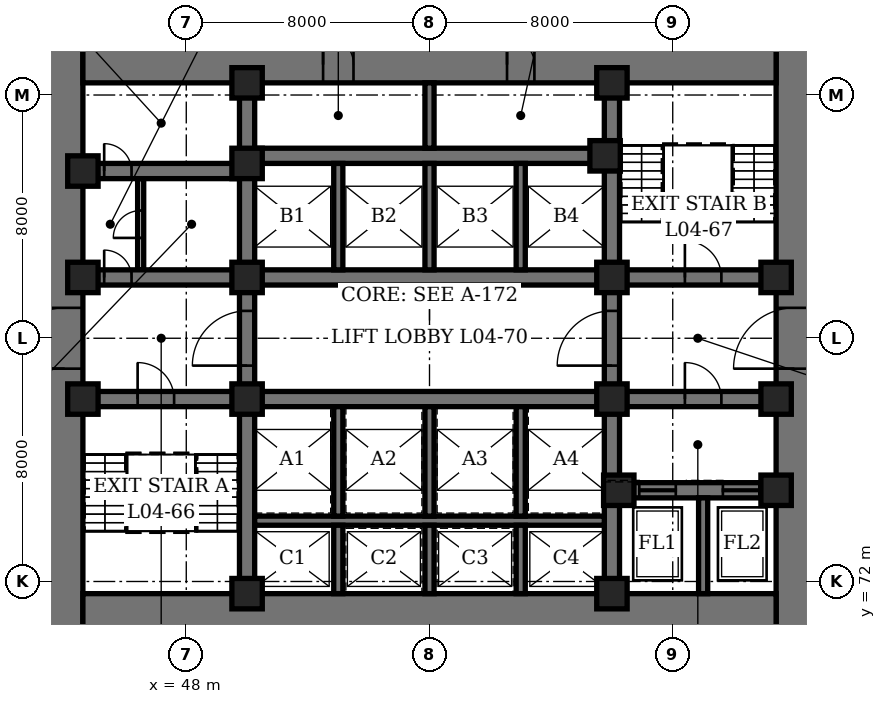
"""IFC4 building model, lengths in metres.
Left out: names, types, materials, properties, quantities, classifications, styles, units other than length and angle.
Written with IfcOpenShell. Run it as: python <this file> out.ifc"""

import sys

from ifc_helpers import new_model, si_unit, direction, frame, frame_2d, origin, origin_2d, place, context, subcontext, project, spatial, rectangle, hollow_rectangle, extrude, element, fill, save


model = new_model("IFC4")
c1 = context("Model", 3, precision=1e-05, world=origin(), true_north=direction((0.0, 1.0)))
c2 = subcontext(c1, "Body", "Model", "MODEL_VIEW")
j1 = project(units=[si_unit("LENGTHUNIT", "METRE"), si_unit("PLANEANGLEUNIT", "RADIAN")], contexts=[c1])
p1 = place(None, origin())
s1 = spatial("IfcSite", under=j1, at=p1, CompositionType="ELEMENT")
p2 = place(p1, origin())
s2 = spatial("IfcBuilding", under=s1, at=p2, CompositionType="ELEMENT")
p3 = place(p2, frame((0.0, 0.0, 19.9)))
s3 = spatial("IfcBuildingStorey", under=s2, at=p3, CompositionType="ELEMENT", Elevation=19.9)
p4 = place(p3, frame((44.0, 70.4, 0.0), z_axis=(0.0, 0.0, 1.0), x_axis=(0.0, 1.0, 0.0)))
e1 = element("IfcWall", 1, at=p4, inside=s3, PredefinedType="SHEAR", context=c2, shape_type="SweptSolid", body=[
    extrude(rectangle(XDim=19.2, YDim=1.2, at=frame_2d((9.6, 0.0))), origin(), (0.0, 0.0, 1.0), 6.0),
])
p5 = place(p4, frame((8.6, 0.0, 0.0)))
e2 = element("IfcOpeningElement", 2, at=p5, cuts=e1, PredefinedType="OPENING", context=c2, shape_type="SweptSolid", body=[
    extrude(rectangle(XDim=2.0, YDim=2.4, at=frame_2d((1.0, 1.2))), frame((0.0, 0.61, 0.0), z_axis=(0.0, -1.0, 0.0), x_axis=(1.0, 0.0, 0.0)), (0.0, 0.0, 1.0), 1.22),
])
p6 = place(p3, frame((68.0, 70.4, 0.0), z_axis=(0.0, 0.0, 1.0), x_axis=(0.0, 1.0, 0.0)))
e3 = element("IfcWall", 3, at=p6, inside=s3, PredefinedType="SHEAR", context=c2, shape_type="SweptSolid", body=[
    extrude(rectangle(XDim=19.2, YDim=1.2, at=frame_2d((9.6, 0.0))), origin(), (0.0, 0.0, 1.0), 6.0),
])
p7 = place(p6, frame((8.6, 0.0, 0.0)))
e4 = element("IfcOpeningElement", 4, at=p7, cuts=e3, PredefinedType="OPENING", context=c2, shape_type="SweptSolid", body=[
    extrude(rectangle(XDim=2.0, YDim=2.4, at=frame_2d((1.0, 1.2))), frame((0.0, 0.61, 0.0), z_axis=(0.0, -1.0, 0.0), x_axis=(1.0, 0.0, 0.0)), (0.0, 0.0, 1.0), 1.22),
])
p8 = place(p3, frame((44.6, 71.0, 0.0), z_axis=(0.0, 0.0, 1.0), x_axis=(1.0, 0.0, 0.0)))
e5 = element("IfcWall", 5, at=p8, inside=s3, PredefinedType="SHEAR", context=c2, shape_type="SweptSolid", body=[
    extrude(rectangle(XDim=22.8, YDim=1.2, at=frame_2d((11.4, 0.0))), origin(), (0.0, 0.0, 1.0), 6.0),
])
p9 = place(p3, frame((44.6, 89.0, 0.0), z_axis=(0.0, 0.0, 1.0), x_axis=(1.0, 0.0, 0.0)))
e6 = element("IfcWall", 6, at=p9, inside=s3, PredefinedType="SHEAR", context=c2, shape_type="SweptSolid", body=[
    extrude(rectangle(XDim=22.8, YDim=1.2, at=frame_2d((11.4, 0.0))), origin(), (0.0, 0.0, 1.0), 6.0),
])
p10 = place(p9, frame((7.9, 0.0, 0.0)))
e7 = element("IfcOpeningElement", 7, at=p10, cuts=e6, PredefinedType="OPENING", context=c2, shape_type="SweptSolid", body=[
    extrude(rectangle(XDim=1.0, YDim=2.1, at=frame_2d((0.5, 1.05))), frame((0.0, 0.61, 0.0), z_axis=(0.0, -1.0, 0.0), x_axis=(1.0, 0.0, 0.0)), (0.0, 0.0, 1.0), 1.22),
])
p11 = place(p9, frame((13.95, 0.0, 0.0)))
e8 = element("IfcOpeningElement", 8, at=p11, cuts=e6, PredefinedType="OPENING", context=c2, shape_type="SweptSolid", body=[
    extrude(rectangle(XDim=0.9, YDim=2.1, at=frame_2d((0.45, 1.05))), frame((0.0, 0.61, 0.0), z_axis=(0.0, -1.0, 0.0), x_axis=(1.0, 0.0, 0.0)), (0.0, 0.0, 1.0), 1.22),
])
p12 = place(p3, frame((50.0, 71.6, 0.0), z_axis=(0.0, 0.0, 1.0), x_axis=(0.0, 1.0, 0.0)))
e9 = element("IfcWall", 9, at=p12, inside=s3, PredefinedType="SHEAR", context=c2, shape_type="SweptSolid", body=[
    extrude(rectangle(XDim=16.8, YDim=0.5, at=frame_2d((8.4, 0.0))), origin(), (0.0, 0.0, 1.0), 6.0),
])
p13 = place(p12, frame((7.5, 0.0, 0.0)))
e10 = element("IfcOpeningElement", 10, at=p13, cuts=e9, PredefinedType="OPENING", context=c2, shape_type="SweptSolid", body=[
    extrude(rectangle(XDim=1.8, YDim=2.4, at=frame_2d((0.9, 1.2))), frame((0.0, 0.26, 0.0), z_axis=(0.0, -1.0, 0.0), x_axis=(1.0, 0.0, 0.0)), (0.0, 0.0, 1.0), 0.52),
])
p14 = place(p3, frame((62.0, 71.6, 0.0), z_axis=(0.0, 0.0, 1.0), x_axis=(0.0, 1.0, 0.0)))
e11 = element("IfcWall", 11, at=p14, inside=s3, PredefinedType="SHEAR", context=c2, shape_type="SweptSolid", body=[
    extrude(rectangle(XDim=16.8, YDim=0.5, at=frame_2d((8.4, 0.0))), origin(), (0.0, 0.0, 1.0), 6.0),
])
p15 = place(p14, frame((7.5, 0.0, 0.0)))
e12 = element("IfcOpeningElement", 12, at=p15, cuts=e11, PredefinedType="OPENING", context=c2, shape_type="SweptSolid", body=[
    extrude(rectangle(XDim=1.8, YDim=2.4, at=frame_2d((0.9, 1.2))), frame((0.0, 0.26, 0.0), z_axis=(0.0, -1.0, 0.0), x_axis=(1.0, 0.0, 0.0)), (0.0, 0.0, 1.0), 0.52),
])
p16 = place(p3, frame((44.6, 78.0, 0.0), z_axis=(0.0, 0.0, 1.0), x_axis=(1.0, 0.0, 0.0)))
e13 = element("IfcWall", 13, at=p16, inside=s3, PredefinedType="SHEAR", context=c2, shape_type="SweptSolid", body=[
    extrude(rectangle(XDim=5.15, YDim=0.5, at=frame_2d((2.575, 0.0))), origin(), (0.0, 0.0, 1.0), 6.0),
])
p17 = place(p16, frame((1.8, 0.0, 0.0)))
e14 = element("IfcOpeningElement", 14, at=p17, cuts=e13, PredefinedType="OPENING", context=c2, shape_type="SweptSolid", body=[
    extrude(rectangle(XDim=1.2, YDim=2.1, at=frame_2d((0.6, 1.05))), frame((0.0, 0.26, 0.0), z_axis=(0.0, -1.0, 0.0), x_axis=(1.0, 0.0, 0.0)), (0.0, 0.0, 1.0), 0.52),
])
p18 = place(p3, frame((44.6, 82.0, 0.0), z_axis=(0.0, 0.0, 1.0), x_axis=(1.0, 0.0, 0.0)))
e15 = element("IfcWall", 15, at=p18, inside=s3, PredefinedType="SHEAR", context=c2, shape_type="SweptSolid", body=[
    extrude(rectangle(XDim=5.15, YDim=0.5, at=frame_2d((2.575, 0.0))), origin(), (0.0, 0.0, 1.0), 6.0),
])
p19 = place(p18, frame((0.7, 0.0, 0.0)))
e16 = element("IfcOpeningElement", 16, at=p19, cuts=e15, PredefinedType="OPENING", context=c2, shape_type="SweptSolid", body=[
    extrude(rectangle(XDim=0.9, YDim=2.1, at=frame_2d((0.45, 1.05))), frame((0.0, 0.26, 0.0), z_axis=(0.0, -1.0, 0.0), x_axis=(1.0, 0.0, 0.0)), (0.0, 0.0, 1.0), 0.52),
])
p20 = place(p3, frame((44.6, 85.5, 0.0), z_axis=(0.0, 0.0, 1.0), x_axis=(1.0, 0.0, 0.0)))
e17 = element("IfcWall", 17, at=p20, inside=s3, PredefinedType="SHEAR", context=c2, shape_type="SweptSolid", body=[
    extrude(rectangle(XDim=5.15, YDim=0.5, at=frame_2d((2.575, 0.0))), origin(), (0.0, 0.0, 1.0), 6.0),
])
p21 = place(p20, frame((0.7, 0.0, 0.0)))
e18 = element("IfcOpeningElement", 18, at=p21, cuts=e17, PredefinedType="OPENING", context=c2, shape_type="SweptSolid", body=[
    extrude(rectangle(XDim=0.9, YDim=2.1, at=frame_2d((0.45, 1.05))), frame((0.0, 0.26, 0.0), z_axis=(0.0, -1.0, 0.0), x_axis=(1.0, 0.0, 0.0)), (0.0, 0.0, 1.0), 0.52),
])
p22 = place(p3, frame((62.25, 75.0, 0.0), z_axis=(0.0, 0.0, 1.0), x_axis=(1.0, 0.0, 0.0)))
e19 = element("IfcWall", 19, at=p22, inside=s3, PredefinedType="SHEAR", context=c2, shape_type="SweptSolid", body=[
    extrude(rectangle(XDim=5.15, YDim=0.5, at=frame_2d((2.575, 0.0))), origin(), (0.0, 0.0, 1.0), 6.0),
])
p23 = place(p22, frame((0.65, 0.0, 0.0)))
e20 = element("IfcOpeningElement", 20, at=p23, cuts=e19, PredefinedType="OPENING", context=c2, shape_type="SweptSolid", body=[
    extrude(rectangle(XDim=1.2, YDim=2.2, at=frame_2d((0.6, 1.1))), frame((0.0, 0.26, 0.0), z_axis=(0.0, -1.0, 0.0), x_axis=(1.0, 0.0, 0.0)), (0.0, 0.0, 1.0), 0.52),
])
p24 = place(p22, frame((3.4, 0.0, 0.0)))
e21 = element("IfcOpeningElement", 21, at=p24, cuts=e19, PredefinedType="OPENING", context=c2, shape_type="SweptSolid", body=[
    extrude(rectangle(XDim=1.2, YDim=2.2, at=frame_2d((0.6, 1.1))), frame((0.0, 0.26, 0.0), z_axis=(0.0, -1.0, 0.0), x_axis=(1.0, 0.0, 0.0)), (0.0, 0.0, 1.0), 0.52),
])
p25 = place(p3, frame((62.25, 78.0, 0.0), z_axis=(0.0, 0.0, 1.0), x_axis=(1.0, 0.0, 0.0)))
e22 = element("IfcWall", 22, at=p25, inside=s3, PredefinedType="SHEAR", context=c2, shape_type="SweptSolid", body=[
    extrude(rectangle(XDim=5.15, YDim=0.5, at=frame_2d((2.575, 0.0))), origin(), (0.0, 0.0, 1.0), 6.0),
])
p26 = place(p25, frame((2.15, 0.0, 0.0)))
e23 = element("IfcOpeningElement", 23, at=p26, cuts=e22, PredefinedType="OPENING", context=c2, shape_type="SweptSolid", body=[
    extrude(rectangle(XDim=1.2, YDim=2.1, at=frame_2d((0.6, 1.05))), frame((0.0, 0.26, 0.0), z_axis=(0.0, -1.0, 0.0), x_axis=(1.0, 0.0, 0.0)), (0.0, 0.0, 1.0), 0.52),
])
p27 = place(p3, frame((62.25, 82.0, 0.0), z_axis=(0.0, 0.0, 1.0), x_axis=(1.0, 0.0, 0.0)))
e24 = element("IfcWall", 24, at=p27, inside=s3, PredefinedType="SHEAR", context=c2, shape_type="SweptSolid", body=[
    extrude(rectangle(XDim=5.15, YDim=0.5, at=frame_2d((2.575, 0.0))), origin(), (0.0, 0.0, 1.0), 6.0),
])
p28 = place(p27, frame((2.15, 0.0, 0.0)))
e25 = element("IfcOpeningElement", 25, at=p28, cuts=e24, PredefinedType="OPENING", context=c2, shape_type="SweptSolid", body=[
    extrude(rectangle(XDim=1.2, YDim=2.1, at=frame_2d((0.6, 1.05))), frame((0.0, 0.26, 0.0), z_axis=(0.0, -1.0, 0.0), x_axis=(1.0, 0.0, 0.0)), (0.0, 0.0, 1.0), 0.52),
])
for number, where, z_axis, x_axis in (
    (26, (50.25, 78.0, 0.0), (0.0, 0.0, 1.0), (1.0, 0.0, 0.0)),
    (27, (50.25, 82.0, 0.0), (0.0, 0.0, 1.0), (1.0, 0.0, 0.0)),
    (28, (50.25, 86.0, 0.0), (0.0, 0.0, 1.0), (1.0, 0.0, 0.0)),
):
    element("IfcWall", number, at=place(p3, frame(where, z_axis=z_axis, x_axis=x_axis)), inside=s3, PredefinedType="SHEAR", context=c2, shape_type="SweptSolid", body=[
        extrude(rectangle(XDim=11.5, YDim=0.5, at=frame_2d((5.75, 0.0))), origin(), (0.0, 0.0, 1.0), 6.0),
    ])
p29 = place(p3, frame((50.25, 74.0, 0.0), z_axis=(0.0, 0.0, 1.0), x_axis=(1.0, 0.0, 0.0)))
e29 = element("IfcWall", 29, at=p29, inside=s3, PredefinedType="SHEAR", context=c2, shape_type="SweptSolid", body=[
    extrude(rectangle(XDim=11.5, YDim=0.3, at=frame_2d((5.75, 0.0))), origin(), (0.0, 0.0, 1.0), 6.0),
])
p30 = place(p3, frame((53.0, 71.6, 0.0), z_axis=(0.0, 0.0, 1.0), x_axis=(0.0, 1.0, 0.0)))
e30 = element("IfcWall", 30, at=p30, inside=s3, PredefinedType="SHEAR", context=c2, shape_type="SweptSolid", body=[
    extrude(rectangle(XDim=2.25, YDim=0.3, at=frame_2d((1.125, 0.0))), origin(), (0.0, 0.0, 1.0), 6.0),
])
p31 = place(p3, frame((53.0, 74.15, 0.0), z_axis=(0.0, 0.0, 1.0), x_axis=(0.0, 1.0, 0.0)))
e31 = element("IfcWall", 31, at=p31, inside=s3, PredefinedType="SHEAR", context=c2, shape_type="SweptSolid", body=[
    extrude(rectangle(XDim=3.6, YDim=0.3, at=frame_2d((1.8, 0.0))), origin(), (0.0, 0.0, 1.0), 6.0),
])
p32 = place(p3, frame((53.0, 82.25, 0.0), z_axis=(0.0, 0.0, 1.0), x_axis=(0.0, 1.0, 0.0)))
e32 = element("IfcWall", 32, at=p32, inside=s3, PredefinedType="SHEAR", context=c2, shape_type="SweptSolid", body=[
    extrude(rectangle(XDim=3.5, YDim=0.3, at=frame_2d((1.75, 0.0))), origin(), (0.0, 0.0, 1.0), 6.0),
])
p33 = place(p3, frame((56.0, 71.6, 0.0), z_axis=(0.0, 0.0, 1.0), x_axis=(0.0, 1.0, 0.0)))
e33 = element("IfcWall", 33, at=p33, inside=s3, PredefinedType="SHEAR", context=c2, shape_type="SweptSolid", body=[
    extrude(rectangle(XDim=2.25, YDim=0.3, at=frame_2d((1.125, 0.0))), origin(), (0.0, 0.0, 1.0), 6.0),
])
p34 = place(p3, frame((56.0, 74.15, 0.0), z_axis=(0.0, 0.0, 1.0), x_axis=(0.0, 1.0, 0.0)))
e34 = element("IfcWall", 34, at=p34, inside=s3, PredefinedType="SHEAR", context=c2, shape_type="SweptSolid", body=[
    extrude(rectangle(XDim=3.6, YDim=0.3, at=frame_2d((1.8, 0.0))), origin(), (0.0, 0.0, 1.0), 6.0),
])
p35 = place(p3, frame((56.0, 82.25, 0.0), z_axis=(0.0, 0.0, 1.0), x_axis=(0.0, 1.0, 0.0)))
e35 = element("IfcWall", 35, at=p35, inside=s3, PredefinedType="SHEAR", context=c2, shape_type="SweptSolid", body=[
    extrude(rectangle(XDim=3.5, YDim=0.3, at=frame_2d((1.75, 0.0))), origin(), (0.0, 0.0, 1.0), 6.0),
])
p36 = place(p3, frame((59.0, 71.6, 0.0), z_axis=(0.0, 0.0, 1.0), x_axis=(0.0, 1.0, 0.0)))
e36 = element("IfcWall", 36, at=p36, inside=s3, PredefinedType="SHEAR", context=c2, shape_type="SweptSolid", body=[
    extrude(rectangle(XDim=2.25, YDim=0.3, at=frame_2d((1.125, 0.0))), origin(), (0.0, 0.0, 1.0), 6.0),
])
p37 = place(p3, frame((59.0, 74.15, 0.0), z_axis=(0.0, 0.0, 1.0), x_axis=(0.0, 1.0, 0.0)))
e37 = element("IfcWall", 37, at=p37, inside=s3, PredefinedType="SHEAR", context=c2, shape_type="SweptSolid", body=[
    extrude(rectangle(XDim=3.6, YDim=0.3, at=frame_2d((1.8, 0.0))), origin(), (0.0, 0.0, 1.0), 6.0),
])
p38 = place(p3, frame((59.0, 82.25, 0.0), z_axis=(0.0, 0.0, 1.0), x_axis=(0.0, 1.0, 0.0)))
e38 = element("IfcWall", 38, at=p38, inside=s3, PredefinedType="SHEAR", context=c2, shape_type="SweptSolid", body=[
    extrude(rectangle(XDim=3.5, YDim=0.3, at=frame_2d((1.75, 0.0))), origin(), (0.0, 0.0, 1.0), 6.0),
])
p39 = place(p3, frame((65.0, 71.6, 0.0), z_axis=(0.0, 0.0, 1.0), x_axis=(0.0, 1.0, 0.0)))
e39 = element("IfcWall", 39, at=p39, inside=s3, PredefinedType="SHEAR", context=c2, shape_type="SweptSolid", body=[
    extrude(rectangle(XDim=3.15, YDim=0.3, at=frame_2d((1.575, 0.0))), origin(), (0.0, 0.0, 1.0), 6.0),
])
p40 = place(p3, frame((56.0, 86.25, 0.0), z_axis=(0.0, 0.0, 1.0), x_axis=(0.0, 1.0, 0.0)))
e40 = element("IfcWall", 40, at=p40, inside=s3, PredefinedType="SHEAR", context=c2, shape_type="SweptSolid", body=[
    extrude(rectangle(XDim=2.15, YDim=0.3, at=frame_2d((1.075, 0.0))), origin(), (0.0, 0.0, 1.0), 6.0),
])
for number, where, z_axis, x_axis in (
    (41, (44.6, 78.0, 0.0), (0.0, 0.0, 1.0), (1.0, 0.0, 0.0)),
    (42, (44.6, 82.0, 0.0), (0.0, 0.0, 1.0), (1.0, 0.0, 0.0)),
    (43, (44.6, 85.5, 0.0), (0.0, 0.0, 1.0), (1.0, 0.0, 0.0)),
    (44, (50.0, 71.6, 0.0), (0.0, 0.0, 1.0), (1.0, 0.0, 0.0)),
    (45, (50.0, 78.0, 0.0), (0.0, 0.0, 1.0), (1.0, 0.0, 0.0)),
    (46, (50.0, 82.0, 0.0), (0.0, 0.0, 1.0), (1.0, 0.0, 0.0)),
    (47, (50.0, 85.75, 0.0), (0.0, 0.0, 1.0), (1.0, 0.0, 0.0)),
    (48, (50.0, 88.4, 0.0), (0.0, 0.0, 1.0), (1.0, 0.0, 0.0)),
    (49, (61.775, 86.0, 0.0), (0.0, 0.0, 1.0), (1.0, 0.0, 0.0)),
    (50, (62.0, 71.6, 0.0), (0.0, 0.0, 1.0), (1.0, 0.0, 0.0)),
    (51, (62.0, 78.0, 0.0), (0.0, 0.0, 1.0), (1.0, 0.0, 0.0)),
    (52, (62.0, 82.0, 0.0), (0.0, 0.0, 1.0), (1.0, 0.0, 0.0)),
    (53, (62.0, 88.4, 0.0), (0.0, 0.0, 1.0), (1.0, 0.0, 0.0)),
    (54, (62.225, 75.0, 0.0), (0.0, 0.0, 1.0), (1.0, 0.0, 0.0)),
    (55, (67.4, 75.0, 0.0), (0.0, 0.0, 1.0), (1.0, 0.0, 0.0)),
    (56, (67.4, 78.0, 0.0), (0.0, 0.0, 1.0), (1.0, 0.0, 0.0)),
    (57, (67.4, 82.0, 0.0), (0.0, 0.0, 1.0), (1.0, 0.0, 0.0)),
):
    element("IfcColumn", number, at=place(p3, frame(where, z_axis=z_axis, x_axis=x_axis)), inside=s3, PredefinedType="COLUMN", context=c2, shape_type="SweptSolid", body=[
        extrude(hollow_rectangle(XDim=1.0, YDim=1.0, WallThickness=0.15, at=origin_2d()), origin(), (0.0, 0.0, 1.0), 6.0),
    ])
p41 = place(p3, frame((46.5, 82.25, 0.0), z_axis=(0.0, 0.0, 1.0), x_axis=(0.0, 1.0, 0.0)))
e58 = element("IfcWall", 58, at=p41, inside=s3, PredefinedType="PARTITIONING", context=c2, shape_type="SweptSolid", body=[
    extrude(rectangle(XDim=3.0, YDim=0.2, at=frame_2d((1.5, 0.0))), origin(), (0.0, 0.0, 1.0), 5.75),
])
p42 = place(p41, frame((1.05, 0.0, 0.0)))
e59 = element("IfcOpeningElement", 59, at=p42, cuts=e58, PredefinedType="OPENING", context=c2, shape_type="SweptSolid", body=[
    extrude(rectangle(XDim=0.9, YDim=2.1, at=frame_2d((0.45, 1.05))), frame((0.0, 0.11, 0.0), z_axis=(0.0, -1.0, 0.0), x_axis=(1.0, 0.0, 0.0)), (0.0, 0.0, 1.0), 0.22),
])
p43 = place(p19, origin())
e60 = element("IfcDoor", 60, at=p43, inside=s3, OperationType="SINGLE_SWING_LEFT", PredefinedType="DOOR", context=c2, shape_type="SweptSolid", body=[
    extrude(rectangle(XDim=0.9, YDim=2.1, at=frame_2d((0.45, 1.05))), frame((0.0, 0.25, 0.0), z_axis=(0.0, -1.0, 0.0), x_axis=(1.0, 0.0, 0.0)), (0.0, 0.0, 1.0), 0.5),
])
fill(e16, e60)
p44 = place(p42, origin())
e61 = element("IfcDoor", 61, at=p44, inside=s3, OperationType="SINGLE_SWING_RIGHT", PredefinedType="DOOR", context=c2, shape_type="SweptSolid", body=[
    extrude(rectangle(XDim=0.9, YDim=2.1, at=frame_2d((0.45, 1.05))), frame((0.0, 0.1, 0.0), z_axis=(0.0, -1.0, 0.0), x_axis=(1.0, 0.0, 0.0)), (0.0, 0.0, 1.0), 0.199),
])
fill(e59, e61)
p45 = place(p21, origin())
e62 = element("IfcDoor", 62, at=p45, inside=s3, OperationType="SINGLE_SWING_RIGHT", PredefinedType="DOOR", context=c2, shape_type="SweptSolid", body=[
    extrude(rectangle(XDim=0.9, YDim=2.1, at=frame_2d((0.45, 1.05))), frame((0.0, 0.25, 0.0), z_axis=(0.0, -1.0, 0.0), x_axis=(1.0, 0.0, 0.0)), (0.0, 0.0, 1.0), 0.5),
])
fill(e18, e62)
p46 = place(p10, origin())
e63 = element("IfcDoor", 63, at=p46, inside=s3, OperationType="SINGLE_SWING_LEFT", PredefinedType="DOOR", context=c2, shape_type="SweptSolid", body=[
    extrude(rectangle(XDim=1.0, YDim=2.1, at=frame_2d((0.5, 1.05))), frame((0.0, 0.35, 0.0), z_axis=(0.0, -1.0, 0.0), x_axis=(1.0, 0.0, 0.0)), (0.0, 0.0, 1.0), 0.7),
])
fill(e7, e63)
p47 = place(p11, origin())
e64 = element("IfcDoor", 64, at=p47, inside=s3, OperationType="SINGLE_SWING_LEFT", PredefinedType="DOOR", context=c2, shape_type="SweptSolid", body=[
    extrude(rectangle(XDim=0.9, YDim=2.1, at=frame_2d((0.45, 1.05))), frame((0.0, 0.35, 0.0), z_axis=(0.0, -1.0, 0.0), x_axis=(1.0, 0.0, 0.0)), (0.0, 0.0, 1.0), 0.7),
])
fill(e8, e64)
p48 = place(p17, origin())
e65 = element("IfcDoor", 65, at=p48, inside=s3, OperationType="SINGLE_SWING_LEFT", PredefinedType="DOOR", context=c2, shape_type="SweptSolid", body=[
    extrude(rectangle(XDim=1.2, YDim=2.1, at=frame_2d((0.6, 1.05))), frame((0.0, 0.25, 0.0), z_axis=(0.0, -1.0, 0.0), x_axis=(1.0, 0.0, 0.0)), (0.0, 0.0, 1.0), 0.5),
])
fill(e14, e65)
p49 = place(p28, origin())
e66 = element("IfcDoor", 66, at=p49, inside=s3, OperationType="SINGLE_SWING_LEFT", PredefinedType="DOOR", context=c2, shape_type="SweptSolid", body=[
    extrude(rectangle(XDim=1.2, YDim=2.1, at=frame_2d((0.6, 1.05))), frame((0.0, 0.25, 0.0), z_axis=(0.0, -1.0, 0.0), x_axis=(1.0, 0.0, 0.0)), (0.0, 0.0, 1.0), 0.5),
])
fill(e25, e66)
p50 = place(p5, origin())
e67 = element("IfcDoor", 67, at=p50, inside=s3, OperationType="DOUBLE_DOOR_SINGLE_SWING", PredefinedType="DOOR", context=c2, shape_type="SweptSolid", body=[
    extrude(rectangle(XDim=2.0, YDim=2.4, at=frame_2d((1.0, 1.2))), frame((0.0, 0.35, 0.0), z_axis=(0.0, -1.0, 0.0), x_axis=(1.0, 0.0, 0.0)), (0.0, 0.0, 1.0), 0.7),
])
fill(e2, e67)
p51 = place(p7, origin())
e68 = element("IfcDoor", 68, at=p51, inside=s3, OperationType="DOUBLE_DOOR_SINGLE_SWING", PredefinedType="DOOR", context=c2, shape_type="SweptSolid", body=[
    extrude(rectangle(XDim=2.0, YDim=2.4, at=frame_2d((1.0, 1.2))), frame((0.0, 0.35, 0.0), z_axis=(0.0, -1.0, 0.0), x_axis=(1.0, 0.0, 0.0)), (0.0, 0.0, 1.0), 0.7),
])
fill(e4, e68)
p52 = place(p13, origin())
e69 = element("IfcDoor", 69, at=p52, inside=s3, OperationType="DOUBLE_DOOR_SINGLE_SWING", PredefinedType="DOOR", context=c2, shape_type="SweptSolid", body=[
    extrude(rectangle(XDim=1.8, YDim=2.4, at=frame_2d((0.9, 1.2))), frame((0.0, 0.25, 0.0), z_axis=(0.0, -1.0, 0.0), x_axis=(1.0, 0.0, 0.0)), (0.0, 0.0, 1.0), 0.5),
])
fill(e10, e69)
p53 = place(p15, origin())
e70 = element("IfcDoor", 70, at=p53, inside=s3, OperationType="DOUBLE_DOOR_SINGLE_SWING", PredefinedType="DOOR", context=c2, shape_type="SweptSolid", body=[
    extrude(rectangle(XDim=1.8, YDim=2.4, at=frame_2d((0.9, 1.2))), frame((0.0, 0.25, 0.0), z_axis=(0.0, -1.0, 0.0), x_axis=(1.0, 0.0, 0.0)), (0.0, 0.0, 1.0), 0.5),
])
fill(e12, e70)
p54 = place(p26, origin())
e71 = element("IfcDoor", 71, at=p54, inside=s3, OperationType="SINGLE_SWING_RIGHT", PredefinedType="DOOR", context=c2, shape_type="SweptSolid", body=[
    extrude(rectangle(XDim=1.2, YDim=2.1, at=frame_2d((0.6, 1.05))), frame((0.0, 0.25, 0.0), z_axis=(0.0, -1.0, 0.0), x_axis=(1.0, 0.0, 0.0)), (0.0, 0.0, 1.0), 0.5),
])
fill(e23, e71)
p55 = place(p23, origin())
e72 = element("IfcDoor", 72, at=p55, inside=s3, OperationType="SLIDING_TO_LEFT", PredefinedType="DOOR", context=c2, shape_type="SweptSolid", body=[
    extrude(rectangle(XDim=1.2, YDim=2.2, at=frame_2d((0.6, 1.1))), frame((0.0, 0.25, 0.0), z_axis=(0.0, -1.0, 0.0), x_axis=(1.0, 0.0, 0.0)), (0.0, 0.0, 1.0), 0.5),
])
fill(e20, e72)
p56 = place(p24, origin())
e73 = element("IfcDoor", 73, at=p56, inside=s3, OperationType="SLIDING_TO_LEFT", PredefinedType="DOOR", context=c2, shape_type="SweptSolid", body=[
    extrude(rectangle(XDim=1.2, YDim=2.2, at=frame_2d((0.6, 1.1))), frame((0.0, 0.25, 0.0), z_axis=(0.0, -1.0, 0.0), x_axis=(1.0, 0.0, 0.0)), (0.0, 0.0, 1.0), 0.5),
])
fill(e21, e73)
save(model, sys.argv[1])
